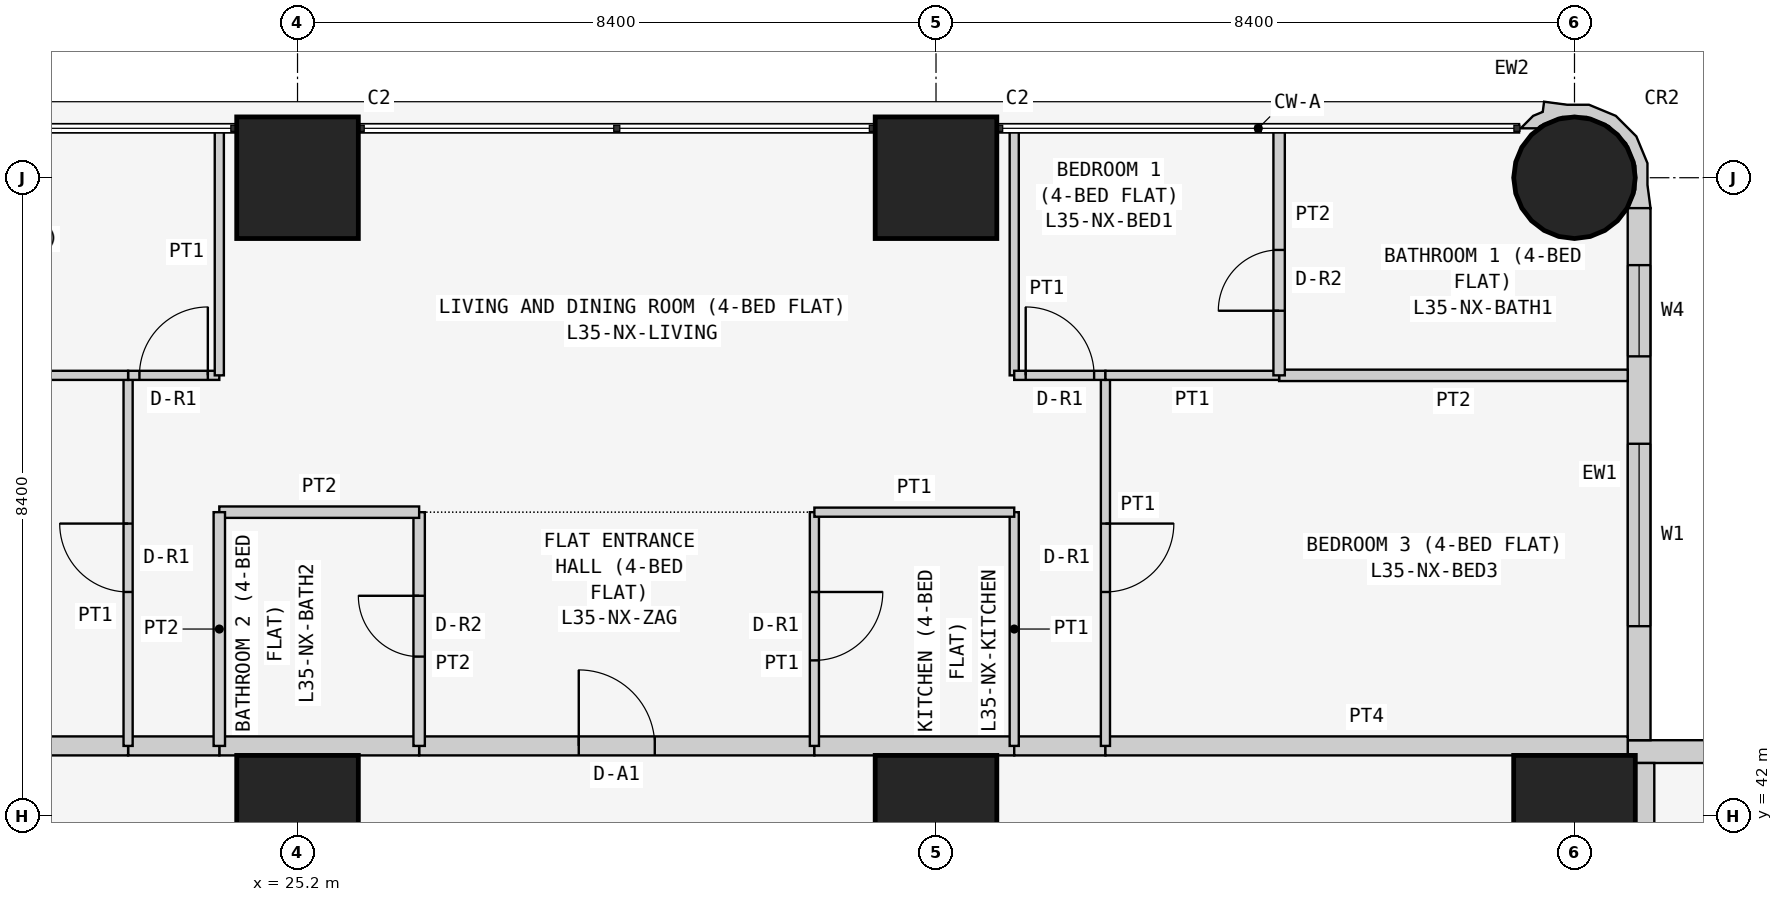
"""IFC4 building model, lengths in metres.
Left out: names, types, materials, properties, quantities, classifications, styles, units other than length and angle.
Written with IfcOpenShell. Run it as: python <this file> out.ifc"""

import sys

from ifc_helpers import new_model, si_unit, direction, frame, frame_2d, origin, origin_2d, place, context, subcontext, project, spatial, polyline, rectangle, circle, outline, extrude, element, fill, save


model = new_model("IFC4")
c1 = context("Model", 3, precision=1e-05, world=origin(), true_north=direction((0.0, 1.0)))
c2 = subcontext(c1, "Body", "Model", "MODEL_VIEW")
j1 = project(units=[si_unit("LENGTHUNIT", "METRE"), si_unit("PLANEANGLEUNIT", "RADIAN")], contexts=[c1])
p1 = place(None, origin())
s1 = spatial("IfcSite", under=j1, at=p1, CompositionType="ELEMENT")
p2 = place(p1, origin())
s2 = spatial("IfcBuilding", under=s1, at=p2, CompositionType="ELEMENT")
p3 = place(p2, frame((0.0, 0.0, 137.7)))
s3 = spatial("IfcBuildingStorey", under=s2, at=p3, CompositionType="ELEMENT", Elevation=137.7)
for number, where, z_axis, x_axis in (
    (1, (25.2, 42.0, 0.0), (0.0, 0.0, 1.0), (1.0, 0.0, 0.0)),
    (2, (25.2, 50.4, 0.0), (0.0, 0.0, 1.0), (1.0, 0.0, 0.0)),
    (3, (33.6, 42.0, 0.0), (0.0, 0.0, 1.0), (1.0, 0.0, 0.0)),
    (4, (33.6, 50.4, 0.0), (0.0, 0.0, 1.0), (1.0, 0.0, 0.0)),
    (5, (42.0, 42.0, 0.0), (0.0, 0.0, 1.0), (1.0, 0.0, 0.0)),
):
    element("IfcColumn", number, at=place(p3, frame(where, z_axis=z_axis, x_axis=x_axis)), inside=s3, PredefinedType="COLUMN", context=c2, shape_type="SweptSolid", body=[
        extrude(rectangle(XDim=1.6, YDim=1.6, at=origin_2d()), origin(), (0.0, 0.0, 1.0), 3.6),
    ])
p4 = place(p3, frame((42.0, 50.4, 0.0), z_axis=(0.0, 0.0, 1.0), x_axis=(1.0, 0.0, 0.0)))
e6 = element("IfcColumn", 6, at=p4, inside=s3, PredefinedType="COLUMN", context=c2, shape_type="SweptSolid", body=[
    extrude(circle(Radius=0.8, at=origin_2d()), origin(), (0.0, 0.0, 1.0), 3.6),
])
p5 = place(p3, frame((58.4, 42.85, 0.0), z_axis=(0.0, 0.0, 1.0), x_axis=(-1.0, 0.0, 0.0)))
e7 = element("IfcWall", 7, at=p5, inside=s3, PredefinedType="SOLIDWALL", context=c2, shape_type="SweptSolid", body=[
    extrude(rectangle(XDim=15.7, YDim=0.3, at=frame_2d((7.85, 0.0))), origin(), (0.0, 0.0, 1.0), 3.45),
])
p6 = place(p5, frame((12.4, 0.0, 0.9)))
e8 = element("IfcOpeningElement", 8, at=p6, cuts=e7, PredefinedType="OPENING", context=c2, shape_type="SweptSolid", body=[
    extrude(rectangle(XDim=1.8, YDim=1.5, at=frame_2d((0.9, 0.75))), frame((0.0, 0.16, 0.0), z_axis=(0.0, -1.0, 0.0), x_axis=(1.0, 0.0, 0.0)), (0.0, 0.0, 1.0), 0.32),
])
p7 = place(p5, frame((9.55, 0.0, 1.5)))
e9 = element("IfcOpeningElement", 9, at=p7, cuts=e7, PredefinedType="OPENING", context=c2, shape_type="SweptSolid", body=[
    extrude(rectangle(XDim=0.9, YDim=0.7, at=frame_2d((0.45, 0.35))), frame((0.0, 0.16, 0.0), z_axis=(0.0, -1.0, 0.0), x_axis=(1.0, 0.0, 0.0)), (0.0, 0.0, 1.0), 0.32),
])
p8 = place(p5, frame((5.1, 0.0, 0.9)))
e10 = element("IfcOpeningElement", 10, at=p8, cuts=e7, PredefinedType="OPENING", context=c2, shape_type="SweptSolid", body=[
    extrude(rectangle(XDim=1.8, YDim=1.5, at=frame_2d((0.9, 0.75))), frame((0.0, 0.16, 0.0), z_axis=(0.0, -1.0, 0.0), x_axis=(1.0, 0.0, 0.0)), (0.0, 0.0, 1.0), 0.32),
])
p9 = place(p5, frame((2.0, 0.0, 0.0)))
e11 = element("IfcOpeningElement", 11, at=p9, cuts=e7, PredefinedType="OPENING", context=c2, shape_type="SweptSolid", body=[
    extrude(rectangle(XDim=0.9, YDim=2.4, at=frame_2d((0.45, 1.2))), frame((0.0, 0.16, 0.0), z_axis=(0.0, -1.0, 0.0), x_axis=(1.0, 0.0, 0.0)), (0.0, 0.0, 1.0), 0.32),
])
p10 = place(p5, frame((0.7, 0.0, 0.9)))
e12 = element("IfcOpeningElement", 12, at=p10, cuts=e7, PredefinedType="OPENING", context=c2, shape_type="SweptSolid", body=[
    extrude(rectangle(XDim=1.2, YDim=1.5, at=frame_2d((0.6, 0.75))), frame((0.0, 0.16, 0.0), z_axis=(0.0, -1.0, 0.0), x_axis=(1.0, 0.0, 0.0)), (0.0, 0.0, 1.0), 0.32),
])
p11 = place(p3, frame((42.85, 43.0, 0.0), z_axis=(0.0, 0.0, 1.0), x_axis=(0.0, 1.0, 0.0)))
e13 = element("IfcWall", 13, at=p11, inside=s3, PredefinedType="SOLIDWALL", context=c2, shape_type="SweptSolid", body=[
    extrude(rectangle(XDim=7.0, YDim=0.3, at=frame_2d((3.5, 0.0))), origin(), (0.0, 0.0, 1.0), 3.45),
])
p12 = place(p11, frame((1.5, 0.0, 0.9)))
e14 = element("IfcOpeningElement", 14, at=p12, cuts=e13, PredefinedType="OPENING", context=c2, shape_type="SweptSolid", body=[
    extrude(rectangle(XDim=2.4, YDim=1.5, at=frame_2d((1.2, 0.75))), frame((0.0, 0.16, 0.0), z_axis=(0.0, -1.0, 0.0), x_axis=(1.0, 0.0, 0.0)), (0.0, 0.0, 1.0), 0.32),
])
p13 = place(p11, frame((5.05, 0.0, 0.9)))
e15 = element("IfcOpeningElement", 15, at=p13, cuts=e13, PredefinedType="OPENING", context=c2, shape_type="SweptSolid", body=[
    extrude(rectangle(XDim=1.2, YDim=1.5, at=frame_2d((0.6, 0.75))), frame((0.0, 0.16, 0.0), z_axis=(0.0, -1.0, 0.0), x_axis=(1.0, 0.0, 0.0)), (0.0, 0.0, 1.0), 0.32),
])
p14 = place(p3, frame((42.817, 50.073, 0.0), z_axis=(0.0, 0.0, 1.0), x_axis=(0.343276641956, 0.93923434088, 0.0)))
e16 = element("IfcWall", 16, at=p14, inside=s3, PredefinedType="SOLIDWALL", context=c2, shape_type="SweptSolid", body=[
    extrude(outline(polyline([(0.266, -0.055), (0.535, 0.044), (0.817, 0.302), (0.978, 0.648), (0.994, 1.03), (0.895, 1.3), (0.828, 1.598), (0.697, 1.569), (0.604, 1.67), (0.394, 1.767), (0.471, 1.556), (0.509, 1.539), (0.724, 1.304), (0.833, 1.005), (0.82, 0.687), (0.686, 0.397), (0.451, 0.182), (0.152, 0.073), (-0.116, 0.084), (-0.128, 0.078), (-0.146, 0.071), (-0.006, -0.197), (0.266, -0.055)])), origin(), (0.0, 0.0, 1.0), 3.45),
])
p15 = place(p3, frame((26.8, 42.925, 0.0), z_axis=(0.0, 0.0, 1.0), x_axis=(1.0, 0.0, 0.0)))
e17 = element("IfcWall", 17, at=p15, inside=s3, PredefinedType="PARTITIONING", context=c2, shape_type="SweptSolid", body=[
    extrude(rectangle(XDim=5.2, YDim=0.25, at=frame_2d((2.6, 0.0))), origin(), (0.0, 0.0, 1.0), 3.45),
])
p16 = place(p15, frame((2.1, 0.0, 0.0)))
e18 = element("IfcOpeningElement", 18, at=p16, cuts=e17, PredefinedType="OPENING", context=c2, shape_type="SweptSolid", body=[
    extrude(rectangle(XDim=1.0, YDim=2.1, at=frame_2d((0.5, 1.05))), frame((0.0, 0.135, 0.0), z_axis=(0.0, -1.0, 0.0), x_axis=(1.0, 0.0, 0.0)), (0.0, 0.0, 1.0), 0.27),
])
p17 = place(p3, frame((24.171, 42.925, 0.0), z_axis=(0.0, 0.0, 1.0), x_axis=(1.0, 0.0, 0.0)))
e19 = element("IfcWall", 19, at=p17, inside=s3, PredefinedType="PARTITIONING", context=c2, shape_type="SweptSolid", body=[
    extrude(rectangle(XDim=2.629, YDim=0.25, at=frame_2d((1.314, 0.0))), origin(), (0.0, 0.0, 1.0), 3.45),
])
p18 = place(p3, frame((32.0, 42.925, 0.0), z_axis=(0.0, 0.0, 1.0), x_axis=(1.0, 0.0, 0.0)))
e20 = element("IfcWall", 20, at=p18, inside=s3, PredefinedType="PARTITIONING", context=c2, shape_type="SweptSolid", body=[
    extrude(rectangle(XDim=2.629, YDim=0.25, at=frame_2d((1.314, 0.0))), origin(), (0.0, 0.0, 1.0), 3.45),
])
p19 = place(p3, frame((22.971, 42.925, 0.0), z_axis=(0.0, 0.0, 1.0), x_axis=(1.0, 0.0, 0.0)))
e21 = element("IfcWall", 21, at=p19, inside=s3, PredefinedType="PARTITIONING", context=c2, shape_type="SweptSolid", body=[
    extrude(rectangle(XDim=1.2, YDim=0.25, at=frame_2d((0.6, 0.0))), origin(), (0.0, 0.0, 1.0), 3.45),
])
p20 = place(p3, frame((34.629, 42.925, 0.0), z_axis=(0.0, 0.0, 1.0), x_axis=(1.0, 0.0, 0.0)))
e22 = element("IfcWall", 22, at=p20, inside=s3, PredefinedType="PARTITIONING", context=c2, shape_type="SweptSolid", body=[
    extrude(rectangle(XDim=1.2, YDim=0.25, at=frame_2d((0.6, 0.0))), origin(), (0.0, 0.0, 1.0), 3.45),
])
for number, where, z_axis, x_axis in (
    (23, (16.1, 42.925, 0.0), (0.0, 0.0, 1.0), (1.0, 0.0, 0.0)),
    (24, (35.829, 42.925, 0.0), (0.0, 0.0, 1.0), (1.0, 0.0, 0.0)),
    (25, (42.925, 42.7, 0.0), (0.0, 0.0, 1.0), (0.0, -1.0, 0.0)),
):
    element("IfcWall", number, at=place(p3, frame(where, z_axis=z_axis, x_axis=x_axis)), inside=s3, PredefinedType="PARTITIONING", context=c2, shape_type="SweptSolid", body=[
        extrude(rectangle(XDim=6.871, YDim=0.25, at=frame_2d((3.436, 0.0))), origin(), (0.0, 0.0, 1.0), 3.45),
    ])
p21 = place(p3, frame((26.8, 46.0, 0.0), z_axis=(0.0, 0.0, 1.0), x_axis=(0.0, -1.0, 0.0)))
e26 = element("IfcWall", 26, at=p21, inside=s3, PredefinedType="PARTITIONING", context=c2, shape_type="SweptSolid", body=[
    extrude(rectangle(XDim=3.075, YDim=0.15, at=frame_2d((1.538, 0.0))), origin(), (0.0, 0.0, 1.0), 3.45),
])
p22 = place(p21, frame((1.1, 0.0, 0.0)))
e27 = element("IfcOpeningElement", 27, at=p22, cuts=e26, PredefinedType="OPENING", context=c2, shape_type="SweptSolid", body=[
    extrude(rectangle(XDim=0.8, YDim=2.1, at=frame_2d((0.4, 1.05))), frame((0.0, 0.085, 0.0), z_axis=(0.0, -1.0, 0.0), x_axis=(1.0, 0.0, 0.0)), (0.0, 0.0, 1.0), 0.17),
])
p23 = place(p3, frame((32.0, 42.925, 0.0), z_axis=(0.0, 0.0, 1.0), x_axis=(0.0, 1.0, 0.0)))
e28 = element("IfcWall", 28, at=p23, inside=s3, PredefinedType="PARTITIONING", context=c2, shape_type="SweptSolid", body=[
    extrude(rectangle(XDim=3.075, YDim=0.12, at=frame_2d((1.538, 0.0))), origin(), (0.0, 0.0, 1.0), 3.45),
])
p24 = place(p23, frame((1.125, 0.0, 0.0)))
e29 = element("IfcOpeningElement", 29, at=p24, cuts=e28, PredefinedType="OPENING", context=c2, shape_type="SweptSolid", body=[
    extrude(rectangle(XDim=0.9, YDim=2.1, at=frame_2d((0.45, 1.05))), frame((0.0, 0.07, 0.0), z_axis=(0.0, -1.0, 0.0), x_axis=(1.0, 0.0, 0.0)), (0.0, 0.0, 1.0), 0.14),
])
p25 = place(p3, frame((26.8, 46.0, 0.0), z_axis=(0.0, 0.0, 1.0), x_axis=(-1.0, 0.0, 0.0)))
e30 = element("IfcWall", 30, at=p25, inside=s3, PredefinedType="PARTITIONING", context=c2, shape_type="SweptSolid", body=[
    extrude(rectangle(XDim=2.629, YDim=0.15, at=frame_2d((1.314, 0.0))), origin(), (0.0, 0.0, 1.0), 3.45),
])
p26 = place(p3, frame((24.171, 46.0, 0.0), z_axis=(0.0, 0.0, 1.0), x_axis=(0.0, -1.0, 0.0)))
e31 = element("IfcWall", 31, at=p26, inside=s3, PredefinedType="PARTITIONING", context=c2, shape_type="SweptSolid", body=[
    extrude(rectangle(XDim=3.075, YDim=0.15, at=frame_2d((1.538, 0.0))), origin(), (0.0, 0.0, 1.0), 3.45),
])
p27 = place(p3, frame((34.629, 42.925, 0.0), z_axis=(0.0, 0.0, 1.0), x_axis=(0.0, 1.0, 0.0)))
e32 = element("IfcWall", 32, at=p27, inside=s3, PredefinedType="PARTITIONING", context=c2, shape_type="SweptSolid", body=[
    extrude(rectangle(XDim=3.075, YDim=0.12, at=frame_2d((1.538, 0.0))), origin(), (0.0, 0.0, 1.0), 3.45),
])
p28 = place(p3, frame((34.629, 46.0, 0.0), z_axis=(0.0, 0.0, 1.0), x_axis=(-1.0, 0.0, 0.0)))
e33 = element("IfcWall", 33, at=p28, inside=s3, PredefinedType="PARTITIONING", context=c2, shape_type="SweptSolid", body=[
    extrude(rectangle(XDim=2.629, YDim=0.12, at=frame_2d((1.314, 0.0))), origin(), (0.0, 0.0, 1.0), 3.45),
])
p29 = place(p3, frame((22.971, 42.925, 0.0), z_axis=(0.0, 0.0, 1.0), x_axis=(0.0, 1.0, 0.0)))
e34 = element("IfcWall", 34, at=p29, inside=s3, PredefinedType="PARTITIONING", context=c2, shape_type="SweptSolid", body=[
    extrude(rectangle(XDim=4.875, YDim=0.12, at=frame_2d((2.438, 0.0))), origin(), (0.0, 0.0, 1.0), 3.45),
])
p30 = place(p29, frame((2.025, 0.0, 0.0)))
e35 = element("IfcOpeningElement", 35, at=p30, cuts=e34, PredefinedType="OPENING", context=c2, shape_type="SweptSolid", body=[
    extrude(rectangle(XDim=0.9, YDim=2.1, at=frame_2d((0.45, 1.05))), frame((0.0, 0.07, 0.0), z_axis=(0.0, -1.0, 0.0), x_axis=(1.0, 0.0, 0.0)), (0.0, 0.0, 1.0), 0.14),
])
p31 = place(p3, frame((22.971, 47.8, 0.0), z_axis=(0.0, 0.0, 1.0), x_axis=(1.0, 0.0, 0.0)))
e36 = element("IfcWall", 36, at=p31, inside=s3, PredefinedType="PARTITIONING", context=c2, shape_type="SweptSolid", body=[
    extrude(rectangle(XDim=1.2, YDim=0.12, at=frame_2d((0.6, 0.0))), origin(), (0.0, 0.0, 1.0), 3.45),
])
p32 = place(p31, frame((0.149, 0.0, 0.0)))
e37 = element("IfcOpeningElement", 37, at=p32, cuts=e36, PredefinedType="OPENING", context=c2, shape_type="SweptSolid", body=[
    extrude(rectangle(XDim=0.9, YDim=2.1, at=frame_2d((0.45, 1.05))), frame((0.0, 0.07, 0.0), z_axis=(0.0, -1.0, 0.0), x_axis=(1.0, 0.0, 0.0)), (0.0, 0.0, 1.0), 0.14),
])
p33 = place(p3, frame((24.171, 47.8, 0.0), z_axis=(0.0, 0.0, 1.0), x_axis=(0.0, 1.0, 0.0)))
e38 = element("IfcWall", 38, at=p33, inside=s3, PredefinedType="PARTITIONING", context=c2, shape_type="SweptSolid", body=[
    extrude(rectangle(XDim=3.25, YDim=0.12, at=frame_2d((1.625, 0.0))), origin(), (0.0, 0.0, 1.0), 3.45),
])
p34 = place(p3, frame((35.829, 47.8, 0.0), z_axis=(0.0, 0.0, 1.0), x_axis=(0.0, -1.0, 0.0)))
e39 = element("IfcWall", 39, at=p34, inside=s3, PredefinedType="PARTITIONING", context=c2, shape_type="SweptSolid", body=[
    extrude(rectangle(XDim=4.875, YDim=0.12, at=frame_2d((2.438, 0.0))), origin(), (0.0, 0.0, 1.0), 3.45),
])
p35 = place(p34, frame((1.95, 0.0, 0.0)))
e40 = element("IfcOpeningElement", 40, at=p35, cuts=e39, PredefinedType="OPENING", context=c2, shape_type="SweptSolid", body=[
    extrude(rectangle(XDim=0.9, YDim=2.1, at=frame_2d((0.45, 1.05))), frame((0.0, 0.07, 0.0), z_axis=(0.0, -1.0, 0.0), x_axis=(1.0, 0.0, 0.0)), (0.0, 0.0, 1.0), 0.14),
])
p36 = place(p3, frame((34.629, 51.05, 0.0), z_axis=(0.0, 0.0, 1.0), x_axis=(0.0, -1.0, 0.0)))
e41 = element("IfcWall", 41, at=p36, inside=s3, PredefinedType="PARTITIONING", context=c2, shape_type="SweptSolid", body=[
    extrude(rectangle(XDim=3.25, YDim=0.12, at=frame_2d((1.625, 0.0))), origin(), (0.0, 0.0, 1.0), 3.45),
])
p37 = place(p3, frame((34.629, 47.8, 0.0), z_axis=(0.0, 0.0, 1.0), x_axis=(1.0, 0.0, 0.0)))
e42 = element("IfcWall", 42, at=p37, inside=s3, PredefinedType="PARTITIONING", context=c2, shape_type="SweptSolid", body=[
    extrude(rectangle(XDim=1.2, YDim=0.12, at=frame_2d((0.6, 0.0))), origin(), (0.0, 0.0, 1.0), 3.45),
])
p38 = place(p37, frame((0.151, 0.0, 0.0)))
e43 = element("IfcOpeningElement", 43, at=p38, cuts=e42, PredefinedType="OPENING", context=c2, shape_type="SweptSolid", body=[
    extrude(rectangle(XDim=0.9, YDim=2.1, at=frame_2d((0.45, 1.05))), frame((0.0, 0.07, 0.0), z_axis=(0.0, -1.0, 0.0), x_axis=(1.0, 0.0, 0.0)), (0.0, 0.0, 1.0), 0.14),
])
p39 = place(p3, frame((22.971, 47.8, 0.0), z_axis=(0.0, 0.0, 1.0), x_axis=(-1.0, 0.0, 0.0)))
e44 = element("IfcWall", 44, at=p39, inside=s3, PredefinedType="PARTITIONING", context=c2, shape_type="SweptSolid", body=[
    extrude(rectangle(XDim=6.871, YDim=0.12, at=frame_2d((3.436, 0.0))), origin(), (0.0, 0.0, 1.0), 3.45),
])
p40 = place(p3, frame((42.7, 47.8, 0.0), z_axis=(0.0, 0.0, 1.0), x_axis=(-1.0, 0.0, 0.0)))
e45 = element("IfcWall", 45, at=p40, inside=s3, PredefinedType="PARTITIONING", context=c2, shape_type="SweptSolid", body=[
    extrude(rectangle(XDim=4.586, YDim=0.15, at=frame_2d((2.293, 0.0))), origin(), (0.0, 0.0, 1.0), 3.45),
])
p41 = place(p3, frame((38.114, 47.8, 0.0), z_axis=(0.0, 0.0, 1.0), x_axis=(-1.0, 0.0, 0.0)))
e46 = element("IfcWall", 46, at=p41, inside=s3, PredefinedType="PARTITIONING", context=c2, shape_type="SweptSolid", body=[
    extrude(rectangle(XDim=2.285, YDim=0.12, at=frame_2d((1.143, 0.0))), origin(), (0.0, 0.0, 1.0), 3.45),
])
p42 = place(p3, frame((38.114, 51.05, 0.0), z_axis=(0.0, 0.0, 1.0), x_axis=(0.0, -1.0, 0.0)))
e47 = element("IfcWall", 47, at=p42, inside=s3, PredefinedType="PARTITIONING", context=c2, shape_type="SweptSolid", body=[
    extrude(rectangle(XDim=3.25, YDim=0.15, at=frame_2d((1.625, 0.0))), origin(), (0.0, 0.0, 1.0), 3.45),
])
p43 = place(p42, frame((1.6, 0.0, 0.0)))
e48 = element("IfcOpeningElement", 48, at=p43, cuts=e47, PredefinedType="OPENING", context=c2, shape_type="SweptSolid", body=[
    extrude(rectangle(XDim=0.8, YDim=2.1, at=frame_2d((0.4, 1.05))), frame((0.0, 0.085, 0.0), z_axis=(0.0, -1.0, 0.0), x_axis=(1.0, 0.0, 0.0)), (0.0, 0.0, 1.0), 0.17),
])
p44 = place(p12, origin())
e49 = element("IfcWindow", 49, at=p44, inside=s3, PartitioningType="SINGLE_PANEL", PredefinedType="WINDOW", context=c2, shape_type="SweptSolid", body=[
    extrude(rectangle(XDim=2.4, YDim=1.5, at=frame_2d((1.2, 0.75))), frame((0.0, 0.03, 0.0), z_axis=(0.0, -1.0, 0.0), x_axis=(1.0, 0.0, 0.0)), (0.0, 0.0, 1.0), 0.06),
])
fill(e14, e49)
p45 = place(p13, origin())
e50 = element("IfcWindow", 50, at=p45, inside=s3, PartitioningType="SINGLE_PANEL", PredefinedType="WINDOW", context=c2, shape_type="SweptSolid", body=[
    extrude(rectangle(XDim=1.2, YDim=1.5, at=frame_2d((0.6, 0.75))), frame((0.0, 0.03, 0.0), z_axis=(0.0, -1.0, 0.0), x_axis=(1.0, 0.0, 0.0)), (0.0, 0.0, 1.0), 0.06),
])
fill(e15, e50)
p46 = place(p16, origin())
e51 = element("IfcDoor", 51, at=p46, inside=s3, OperationType="SINGLE_SWING_LEFT", PredefinedType="DOOR", context=c2, shape_type="SweptSolid", body=[
    extrude(rectangle(XDim=1.0, YDim=2.1, at=frame_2d((0.5, 1.05))), frame((0.0, 0.025, 0.0), z_axis=(0.0, -1.0, 0.0), x_axis=(1.0, 0.0, 0.0)), (0.0, 0.0, 1.0), 0.05),
])
fill(e18, e51)
p47 = place(p22, frame((0.8, 0.0, 0.0), z_axis=(0.0, 0.0, 1.0), x_axis=(-1.0, 0.0, 0.0)))
e52 = element("IfcDoor", 52, at=p47, inside=s3, OperationType="SINGLE_SWING_RIGHT", PredefinedType="DOOR", context=c2, shape_type="SweptSolid", body=[
    extrude(rectangle(XDim=0.8, YDim=2.1, at=frame_2d((0.4, 1.05))), frame((0.0, 0.025, 0.0), z_axis=(0.0, -1.0, 0.0), x_axis=(1.0, 0.0, 0.0)), (0.0, 0.0, 1.0), 0.05),
])
fill(e27, e52)
p48 = place(p24, frame((0.9, 0.0, 0.0), z_axis=(0.0, 0.0, 1.0), x_axis=(-1.0, 0.0, 0.0)))
e53 = element("IfcDoor", 53, at=p48, inside=s3, OperationType="SINGLE_SWING_LEFT", PredefinedType="DOOR", context=c2, shape_type="SweptSolid", body=[
    extrude(rectangle(XDim=0.9, YDim=2.1, at=frame_2d((0.45, 1.05))), frame((0.0, 0.025, 0.0), z_axis=(0.0, -1.0, 0.0), x_axis=(1.0, 0.0, 0.0)), (0.0, 0.0, 1.0), 0.05),
])
fill(e29, e53)
p49 = place(p30, origin())
e54 = element("IfcDoor", 54, at=p49, inside=s3, OperationType="SINGLE_SWING_RIGHT", PredefinedType="DOOR", context=c2, shape_type="SweptSolid", body=[
    extrude(rectangle(XDim=0.9, YDim=2.1, at=frame_2d((0.45, 1.05))), frame((0.0, 0.025, 0.0), z_axis=(0.0, -1.0, 0.0), x_axis=(1.0, 0.0, 0.0)), (0.0, 0.0, 1.0), 0.05),
])
fill(e35, e54)
p50 = place(p32, origin())
e55 = element("IfcDoor", 55, at=p50, inside=s3, OperationType="SINGLE_SWING_RIGHT", PredefinedType="DOOR", context=c2, shape_type="SweptSolid", body=[
    extrude(rectangle(XDim=0.9, YDim=2.1, at=frame_2d((0.45, 1.05))), frame((0.0, 0.025, 0.0), z_axis=(0.0, -1.0, 0.0), x_axis=(1.0, 0.0, 0.0)), (0.0, 0.0, 1.0), 0.05),
])
fill(e37, e55)
p51 = place(p35, origin())
e56 = element("IfcDoor", 56, at=p51, inside=s3, OperationType="SINGLE_SWING_LEFT", PredefinedType="DOOR", context=c2, shape_type="SweptSolid", body=[
    extrude(rectangle(XDim=0.9, YDim=2.1, at=frame_2d((0.45, 1.05))), frame((0.0, 0.025, 0.0), z_axis=(0.0, -1.0, 0.0), x_axis=(1.0, 0.0, 0.0)), (0.0, 0.0, 1.0), 0.05),
])
fill(e40, e56)
p52 = place(p38, origin())
e57 = element("IfcDoor", 57, at=p52, inside=s3, OperationType="SINGLE_SWING_LEFT", PredefinedType="DOOR", context=c2, shape_type="SweptSolid", body=[
    extrude(rectangle(XDim=0.9, YDim=2.1, at=frame_2d((0.45, 1.05))), frame((0.0, 0.025, 0.0), z_axis=(0.0, -1.0, 0.0), x_axis=(1.0, 0.0, 0.0)), (0.0, 0.0, 1.0), 0.05),
])
fill(e43, e57)
p53 = place(p43, frame((0.8, 0.0, 0.0), z_axis=(0.0, 0.0, 1.0), x_axis=(-1.0, 0.0, 0.0)))
e58 = element("IfcDoor", 58, at=p53, inside=s3, OperationType="SINGLE_SWING_LEFT", PredefinedType="DOOR", context=c2, shape_type="SweptSolid", body=[
    extrude(rectangle(XDim=0.8, YDim=2.1, at=frame_2d((0.4, 1.05))), frame((0.0, 0.025, 0.0), z_axis=(0.0, -1.0, 0.0), x_axis=(1.0, 0.0, 0.0)), (0.0, 0.0, 1.0), 0.05),
])
fill(e48, e58)
save(model, sys.argv[1])
